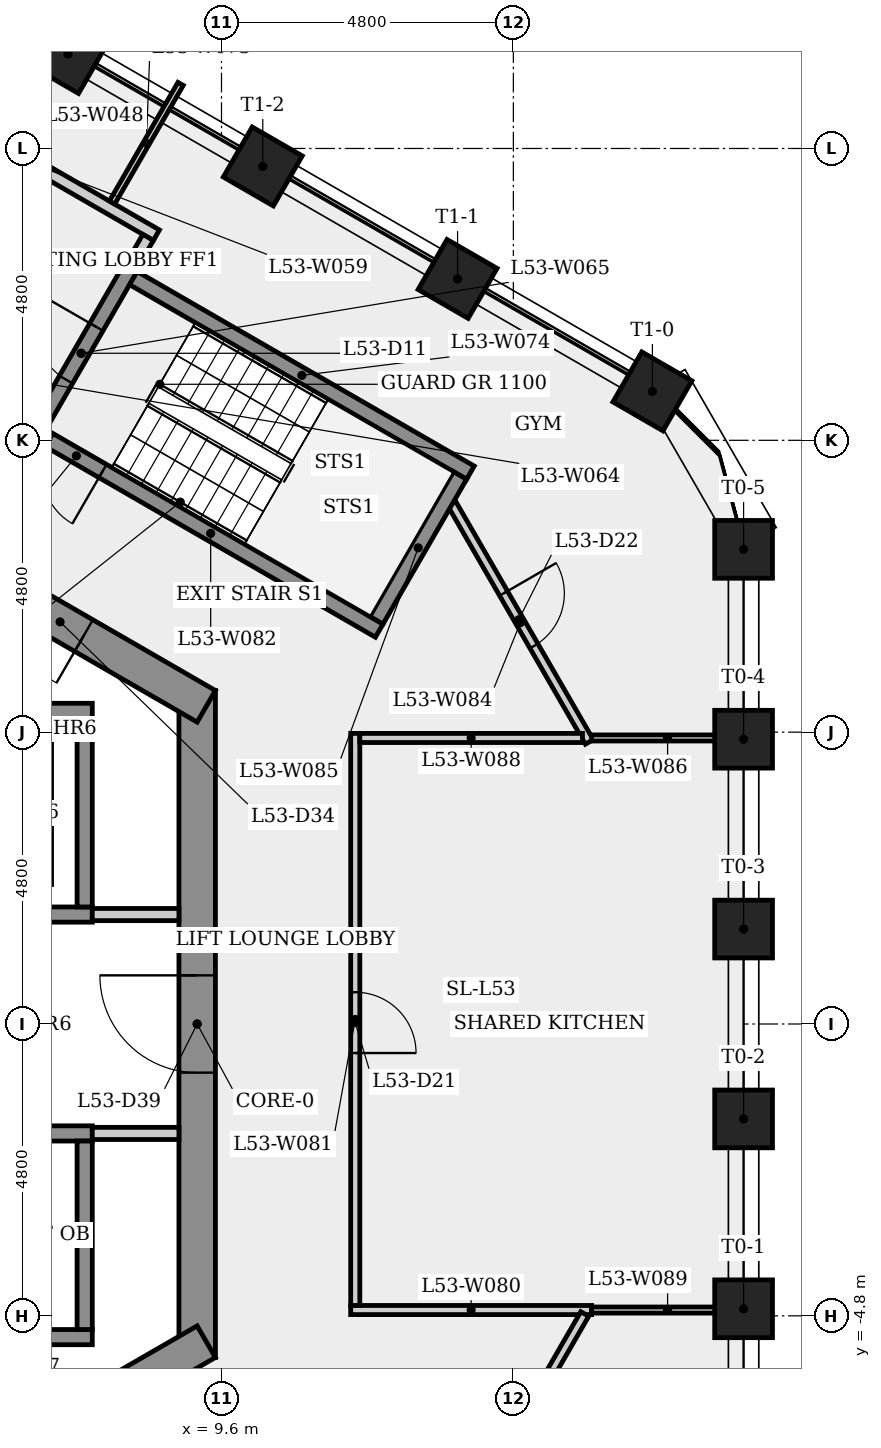
"""IFC4 building model, lengths in metres.
Left out: names, types, materials, properties, quantities, classifications, styles, units other than length and angle.
Written with IfcOpenShell. Run it as: python <this file> out.ifc"""

import sys

from ifc_helpers import new_model, si_unit, direction, frame, frame_2d, origin, origin_2d, place, context, subcontext, project, spatial, rectangle, extrude, element, fill, save


model = new_model("IFC4")
c1 = context("Model", 3, precision=1e-05, world=origin(), true_north=direction((0.0, 1.0)))
c2 = subcontext(c1, "Body", "Model", "MODEL_VIEW")
j1 = project(units=[si_unit("LENGTHUNIT", "METRE"), si_unit("PLANEANGLEUNIT", "RADIAN")], contexts=[c1])
p1 = place(None, origin())
s1 = spatial("IfcSite", under=j1, at=p1, CompositionType="ELEMENT")
p2 = place(p1, origin())
s2 = spatial("IfcBuilding", under=s1, at=p2, CompositionType="ELEMENT")
p3 = place(p2, frame((0.0, 0.0, 198.7)))
s3 = spatial("IfcBuildingStorey", under=s2, at=p3, CompositionType="ELEMENT", Elevation=198.7)
p4 = place(p3, frame((9.2, -5.485, 0.0), z_axis=(0.0, 0.0, 1.0), x_axis=(0.0, 1.0, 0.0)))
e1 = element("IfcWall", 1, at=p4, inside=s3, PredefinedType="SHEAR", context=c2, shape_type="SweptSolid", body=[
    extrude(rectangle(XDim=10.97, YDim=0.6, at=frame_2d((5.485, 0.0))), origin(), (0.0, 0.0, 1.0), 3.4),
])
p5 = place(p4, frame((4.685, 0.0, 0.0)))
e2 = element("IfcOpeningElement", 2, at=p5, cuts=e1, PredefinedType="OPENING", context=c2, shape_type="SweptSolid", body=[
    extrude(rectangle(XDim=1.6, YDim=2.1, at=frame_2d((0.8, 1.05))), frame((0.0, 0.31, 0.0), z_axis=(0.0, -1.0, 0.0), x_axis=(1.0, 0.0, 0.0)), (0.0, 0.0, 1.0), 0.62),
])
p6 = place(p3, frame((9.35, 5.225, 0.0), z_axis=(0.0, 0.0, 1.0), x_axis=(-0.866023993627, 0.500002442456, 0.0)))
e3 = element("IfcWall", 3, at=p6, inside=s3, PredefinedType="SHEAR", context=c2, shape_type="SweptSolid", body=[
    extrude(rectangle(XDim=10.97, YDim=0.6, at=frame_2d((5.485, 0.0))), origin(), (0.0, 0.0, 1.0), 3.4),
])
p7 = place(p6, frame((2.326, 0.0, 0.0)))
e4 = element("IfcOpeningElement", 4, at=p7, cuts=e3, PredefinedType="OPENING", context=c2, shape_type="SweptSolid", body=[
    extrude(rectangle(XDim=0.9, YDim=2.1, at=frame_2d((0.45, 1.05))), frame((0.0, 0.31, 0.0), z_axis=(0.0, -1.0, 0.0), x_axis=(1.0, 0.0, 0.0)), (0.0, 0.0, 1.0), 0.62),
])
p8 = place(p3, frame((-0.15, -10.71, 0.0), z_axis=(0.0, 0.0, 1.0), x_axis=(0.866023993627, 0.500002442456, 0.0)))
e5 = element("IfcWall", 5, at=p8, inside=s3, PredefinedType="SHEAR", context=c2, shape_type="SweptSolid", body=[
    extrude(rectangle(XDim=10.97, YDim=0.6, at=frame_2d((5.485, 0.0))), origin(), (0.0, 0.0, 1.0), 3.4),
])
p9 = place(p8, frame((6.935, 0.0, 0.0)))
e6 = element("IfcOpeningElement", 6, at=p9, cuts=e5, PredefinedType="OPENING", context=c2, shape_type="SweptSolid", body=[
    extrude(rectangle(XDim=0.9, YDim=2.1, at=frame_2d((0.45, 1.05))), frame((0.0, 0.31, 0.0), z_axis=(0.0, -1.0, 0.0), x_axis=(1.0, 0.0, 0.0)), (0.0, 0.0, 1.0), 0.62),
])
for number, where, z_axis, x_axis in (
    (7, (18.187, -4.684, 0.0), (0.0, 0.0, 1.0), (1.0, 0.0, 0.0)),
    (8, (18.187, -1.561, 0.0), (0.0, 0.0, 1.0), (1.0, 0.0, 0.0)),
    (9, (18.187, 1.561, 0.0), (0.0, 0.0, 1.0), (1.0, 0.0, 0.0)),
    (10, (18.187, 4.684, 0.0), (0.0, 0.0, 1.0), (1.0, 0.0, 0.0)),
    (11, (18.187, 7.807, 0.0), (0.0, 0.0, 1.0), (1.0, 0.0, 0.0)),
    (12, (16.687, 10.405, 0.0), (0.0, 0.0, 1.0), (0.5, 0.866, 0.0)),
    (13, (13.483, 12.254, 0.0), (0.0, 0.0, 1.0), (0.5, 0.866, 0.0)),
    (14, (10.279, 14.104, 0.0), (0.0, 0.0, 1.0), (0.5, 0.866, 0.0)),
    (15, (7.075, 15.954, 0.0), (0.0, 0.0, 1.0), (0.5, 0.866, 0.0)),
):
    element("IfcColumn", number, at=place(p3, frame(where, z_axis=z_axis, x_axis=x_axis)), inside=s3, PredefinedType="COLUMN", context=c2, shape_type="SweptSolid", body=[
        extrude(rectangle(XDim=0.95, YDim=0.95, at=origin_2d()), origin(), (0.0, 0.0, 1.0), 3.4),
    ])
p10 = place(p3, frame((-7.475, 1.8, 0.0), z_axis=(0.0, 0.0, 1.0), x_axis=(1.0, 0.0, 0.0)))
e16 = element("IfcWall", 16, at=p10, inside=s3, PredefinedType="SHEAR", context=c2, shape_type="SweptSolid", body=[
    extrude(rectangle(XDim=14.95, YDim=0.25, at=frame_2d((7.475, 0.0))), origin(), (0.0, 0.0, 1.0), 3.0),
])
p11 = place(p10, frame((0.8, 0.0, 0.0)))
e17 = element("IfcOpeningElement", 17, at=p11, cuts=e16, PredefinedType="OPENING", context=c2, shape_type="SweptSolid", body=[
    extrude(rectangle(XDim=1.1, YDim=2.1, at=frame_2d((0.55, 1.05))), frame((0.0, 0.135, 0.0), z_axis=(0.0, -1.0, 0.0), x_axis=(1.0, 0.0, 0.0)), (0.0, 0.0, 1.0), 0.27),
])
p12 = place(p10, frame((3.25, 0.0, 0.0)))
e18 = element("IfcOpeningElement", 18, at=p12, cuts=e16, PredefinedType="OPENING", context=c2, shape_type="SweptSolid", body=[
    extrude(rectangle(XDim=1.1, YDim=2.1, at=frame_2d((0.55, 1.05))), frame((0.0, 0.135, 0.0), z_axis=(0.0, -1.0, 0.0), x_axis=(1.0, 0.0, 0.0)), (0.0, 0.0, 1.0), 0.27),
])
p13 = place(p10, frame((5.7, 0.0, 0.0)))
e19 = element("IfcOpeningElement", 19, at=p13, cuts=e16, PredefinedType="OPENING", context=c2, shape_type="SweptSolid", body=[
    extrude(rectangle(XDim=1.1, YDim=2.1, at=frame_2d((0.55, 1.05))), frame((0.0, 0.135, 0.0), z_axis=(0.0, -1.0, 0.0), x_axis=(1.0, 0.0, 0.0)), (0.0, 0.0, 1.0), 0.27),
])
p14 = place(p10, frame((8.15, 0.0, 0.0)))
e20 = element("IfcOpeningElement", 20, at=p14, cuts=e16, PredefinedType="OPENING", context=c2, shape_type="SweptSolid", body=[
    extrude(rectangle(XDim=1.1, YDim=2.1, at=frame_2d((0.55, 1.05))), frame((0.0, 0.135, 0.0), z_axis=(0.0, -1.0, 0.0), x_axis=(1.0, 0.0, 0.0)), (0.0, 0.0, 1.0), 0.27),
])
p15 = place(p10, frame((10.6, 0.0, 0.0)))
e21 = element("IfcOpeningElement", 21, at=p15, cuts=e16, PredefinedType="OPENING", context=c2, shape_type="SweptSolid", body=[
    extrude(rectangle(XDim=1.1, YDim=2.1, at=frame_2d((0.55, 1.05))), frame((0.0, 0.135, 0.0), z_axis=(0.0, -1.0, 0.0), x_axis=(1.0, 0.0, 0.0)), (0.0, 0.0, 1.0), 0.27),
])
p16 = place(p10, frame((13.05, 0.0, 0.0)))
e22 = element("IfcOpeningElement", 22, at=p16, cuts=e16, PredefinedType="OPENING", context=c2, shape_type="SweptSolid", body=[
    extrude(rectangle(XDim=1.1, YDim=2.1, at=frame_2d((0.55, 1.05))), frame((0.0, 0.135, 0.0), z_axis=(0.0, -1.0, 0.0), x_axis=(1.0, 0.0, 0.0)), (0.0, 0.0, 1.0), 0.27),
])
p17 = place(p3, frame((-7.225, 5.15, 0.0), z_axis=(0.0, 0.0, 1.0), x_axis=(1.0, 0.0, 0.0)))
e23 = element("IfcWall", 23, at=p17, inside=s3, PredefinedType="SHEAR", context=c2, shape_type="SweptSolid", body=[
    extrude(rectangle(XDim=14.7, YDim=0.25, at=frame_2d((7.35, 0.0))), origin(), (0.0, 0.0, 1.0), 3.0),
])
p18 = place(p3, frame((4.459, 15.323, 0.0), z_axis=(0.0, 0.0, 1.0), x_axis=(0.866016039709, -0.500016218704, 0.0)))
e24 = element("IfcWall", 24, at=p18, inside=s3, PredefinedType="PARTITIONING", context=c2, shape_type="SweptSolid", body=[
    extrude(rectangle(XDim=4.7, YDim=0.2, at=frame_2d((2.35, 0.0))), origin(), (0.0, 0.0, 1.0), 3.0),
])
p19 = place(p3, frame((2.575, -5.15, 0.0), z_axis=(0.0, 0.0, 1.0), x_axis=(1.0, 0.0, 0.0)))
e25 = element("IfcWall", 25, at=p19, inside=s3, PredefinedType="SHEAR", context=c2, shape_type="SweptSolid", body=[
    extrude(rectangle(XDim=4.9, YDim=0.25, at=frame_2d((2.45, 0.0))), origin(), (0.0, 0.0, 1.0), 3.0),
])
p20 = place(p3, frame((2.575, -1.8, 0.0), z_axis=(0.0, 0.0, 1.0), x_axis=(1.0, 0.0, 0.0)))
e26 = element("IfcWall", 26, at=p20, inside=s3, PredefinedType="SHEAR", context=c2, shape_type="SweptSolid", body=[
    extrude(rectangle(XDim=4.9, YDim=0.25, at=frame_2d((2.45, 0.0))), origin(), (0.0, 0.0, 1.0), 3.0),
])
p21 = place(p20, frame((0.597, 0.0, 0.0)))
e27 = element("IfcOpeningElement", 27, at=p21, cuts=e26, PredefinedType="OPENING", context=c2, shape_type="SweptSolid", body=[
    extrude(rectangle(XDim=1.1, YDim=2.1, at=frame_2d((0.55, 1.05))), frame((0.0, 0.135, 0.0), z_axis=(0.0, -1.0, 0.0), x_axis=(1.0, 0.0, 0.0)), (0.0, 0.0, 1.0), 0.27),
])
p22 = place(p3, frame((6.48, 9.624, 0.0), z_axis=(0.0, 0.0, 1.0), x_axis=(0.500017246033, 0.866015446554, 0.0)))
e28 = element("IfcWall", 28, at=p22, inside=s3, PredefinedType="SHEAR", context=c2, shape_type="SweptSolid", body=[
    extrude(rectangle(XDim=3.25, YDim=0.25, at=frame_2d((1.625, 0.0))), origin(), (0.0, 0.0, 1.0), 3.0),
])
p23 = place(p22, frame((1.125, 0.0, 0.0)))
e29 = element("IfcOpeningElement", 29, at=p23, cuts=e28, PredefinedType="OPENING", context=c2, shape_type="SweptSolid", body=[
    extrude(rectangle(XDim=1.0, YDim=2.1, at=frame_2d((0.5, 1.05))), frame((0.0, 0.135, 0.0), z_axis=(0.0, -1.0, 0.0), x_axis=(1.0, 0.0, 0.0)), (0.0, 0.0, 1.0), 0.27),
])
p24 = place(p3, frame((7.475, 1.8, 0.0), z_axis=(0.0, 0.0, 1.0), x_axis=(1.0, 0.0, 0.0)))
e30 = element("IfcWall", 30, at=p24, inside=s3, PredefinedType="PARTITIONING", context=c2, shape_type="SweptSolid", body=[
    extrude(rectangle(XDim=1.425, YDim=0.2, at=frame_2d((0.712, 0.0))), origin(), (0.0, 0.0, 1.0), 3.0),
])
for number, where, z_axis, x_axis in (
    (31, (7.35, -1.925, 0.0), (0.0, 0.0, 1.0), (0.0, -1.0, 0.0)),
    (32, (7.35, 5.025, 0.0), (0.0, 0.0, 1.0), (0.0, -1.0, 0.0)),
):
    element("IfcWall", number, at=place(p3, frame(where, z_axis=z_axis, x_axis=x_axis)), inside=s3, PredefinedType="SHEAR", context=c2, shape_type="SweptSolid", body=[
        extrude(rectangle(XDim=3.1, YDim=0.25, at=frame_2d((1.55, 0.0))), origin(), (0.0, 0.0, 1.0), 3.4),
    ])
p25 = place(p3, frame((7.8, 13.51, 0.0), z_axis=(0.0, 0.0, 1.0), x_axis=(0.499994306202, 0.866028691075, 0.0)))
e33 = element("IfcWall", 33, at=p25, inside=s3, PredefinedType="PARTITIONING", context=c2, shape_type="SweptSolid", body=[
    extrude(rectangle(XDim=2.254, YDim=0.1, at=frame_2d((1.127, 0.0))), origin(), (0.0, 0.0, 1.0), 3.0),
])
p26 = place(p3, frame((8.151, 12.268, 0.0), z_axis=(0.0, 0.0, 1.0), x_axis=(0.866025499775, -0.499999833739, 0.0)))
e34 = element("IfcWall", 34, at=p26, inside=s3, PredefinedType="SHEAR", context=c2, shape_type="SweptSolid", body=[
    extrude(rectangle(XDim=6.4, YDim=0.25, at=frame_2d((3.2, 0.0))), origin(), (0.0, 0.0, 1.0), 3.0),
])
p27 = place(p3, frame((8.393, 12.937, 0.0), z_axis=(0.0, 0.0, 1.0), x_axis=(-0.500065409566, -0.86598763626, 0.0)))
e35 = element("IfcWall", 35, at=p27, inside=s3, PredefinedType="PARTITIONING", context=c2, shape_type="SweptSolid", body=[
    extrude(rectangle(XDim=0.575, YDim=0.2, at=frame_2d((0.288, 0.0))), origin(), (0.0, 0.0, 1.0), 3.0),
])
p28 = place(p3, frame((8.9, -1.8, 0.0), z_axis=(0.0, 0.0, 1.0), x_axis=(-1.0, 0.0, 0.0)))
e36 = element("IfcWall", 36, at=p28, inside=s3, PredefinedType="PARTITIONING", context=c2, shape_type="SweptSolid", body=[
    extrude(rectangle(XDim=1.425, YDim=0.2, at=frame_2d((0.712, 0.0))), origin(), (0.0, 0.0, 1.0), 3.0),
])
p29 = place(p3, frame((11.725, -4.705, 0.0), z_axis=(0.0, 0.0, 1.0), x_axis=(1.0, 0.0, 0.0)))
e37 = element("IfcWall", 37, at=p29, inside=s3, PredefinedType="PARTITIONING", context=c2, shape_type="SweptSolid", body=[
    extrude(rectangle(XDim=3.962, YDim=0.15, at=frame_2d((1.981, 0.0))), origin(), (0.0, 0.0, 1.0), 3.0),
])
p30 = place(p3, frame((11.8, 4.78, 0.0), z_axis=(0.0, 0.0, 1.0), x_axis=(0.0, -1.0, 0.0)))
e38 = element("IfcWall", 38, at=p30, inside=s3, PredefinedType="PARTITIONING", context=c2, shape_type="SweptSolid", body=[
    extrude(rectangle(XDim=9.409, YDim=0.15, at=frame_2d((4.705, 0.0))), origin(), (0.0, 0.0, 1.0), 3.0),
])
p31 = place(p30, frame((4.257, 0.0, 0.0)))
e39 = element("IfcOpeningElement", 39, at=p31, cuts=e38, PredefinedType="OPENING", context=c2, shape_type="SweptSolid", body=[
    extrude(rectangle(XDim=1.0, YDim=2.1, at=frame_2d((0.5, 1.05))), frame((0.0, 0.085, 0.0), z_axis=(0.0, -1.0, 0.0), x_axis=(1.0, 0.0, 0.0)), (0.0, 0.0, 1.0), 0.17),
])
p32 = place(p3, frame((12.194, 6.47, 0.0), z_axis=(0.0, 0.0, 1.0), x_axis=(-0.866025499775, 0.499999833739, 0.0)))
e40 = element("IfcWall", 40, at=p32, inside=s3, PredefinedType="SHEAR", context=c2, shape_type="SweptSolid", body=[
    extrude(rectangle(XDim=6.4, YDim=0.25, at=frame_2d((3.2, 0.0))), origin(), (0.0, 0.0, 1.0), 3.0),
])
p33 = place(p32, frame((5.25, 0.0, 0.0)))
e41 = element("IfcOpeningElement", 41, at=p33, cuts=e40, PredefinedType="OPENING", context=c2, shape_type="SweptSolid", body=[
    extrude(rectangle(XDim=1.0, YDim=2.1, at=frame_2d((0.5, 1.05))), frame((0.0, 0.135, 0.0), z_axis=(0.0, -1.0, 0.0), x_axis=(1.0, 0.0, 0.0)), (0.0, 0.0, 1.0), 0.27),
])
p34 = place(p3, frame((13.383, 8.564, 0.0), z_axis=(0.0, 0.0, 1.0), x_axis=(0.499980487887, -0.866036668815, 0.0)))
e42 = element("IfcWall", 42, at=p34, inside=s3, PredefinedType="PARTITIONING", context=c2, shape_type="SweptSolid", body=[
    extrude(rectangle(XDim=4.532, YDim=0.15, at=frame_2d((2.266, 0.0))), origin(), (0.0, 0.0, 1.0), 3.0),
])
p35 = place(p34, frame((1.711, 0.0, 0.0)))
e43 = element("IfcOpeningElement", 43, at=p35, cuts=e42, PredefinedType="OPENING", context=c2, shape_type="SweptSolid", body=[
    extrude(rectangle(XDim=1.0, YDim=2.1, at=frame_2d((0.5, 1.05))), frame((0.0, 0.085, 0.0), z_axis=(0.0, -1.0, 0.0), x_axis=(1.0, 0.0, 0.0)), (0.0, 0.0, 1.0), 0.17),
])
p36 = place(p3, frame((12.148, 6.641, 0.0), z_axis=(0.0, 0.0, 1.0), x_axis=(0.500034990121, 0.866005201286, 0.0)))
e44 = element("IfcWall", 44, at=p36, inside=s3, PredefinedType="SHEAR", context=c2, shape_type="SweptSolid", body=[
    extrude(rectangle(XDim=2.75, YDim=0.25, at=frame_2d((1.375, 0.0))), origin(), (0.0, 0.0, 1.0), 3.0),
])
p37 = place(p3, frame((15.687, 4.705, 0.0), z_axis=(0.0, 0.0, 1.0), x_axis=(1.0, 0.0, 0.0)))
e45 = element("IfcWall", 45, at=p37, inside=s3, PredefinedType="PARTITIONING", context=c2, shape_type="SweptSolid", body=[
    extrude(rectangle(XDim=2.5, YDim=0.1, at=frame_2d((1.25, 0.0))), origin(), (0.0, 0.0, 1.0), 3.0),
])
p38 = place(p3, frame((15.574, -4.769, 0.0), z_axis=(0.0, 0.0, 1.0), x_axis=(-0.499999914436, -0.866025453185, 0.0)))
e46 = element("IfcWall", 46, at=p38, inside=s3, PredefinedType="PARTITIONING", context=c2, shape_type="SweptSolid", body=[
    extrude(rectangle(XDim=7.896, YDim=0.15, at=frame_2d((3.948, 0.0))), origin(), (0.0, 0.0, 1.0), 3.0),
])
p39 = place(p38, frame((3.448, 0.0, 0.0)))
e47 = element("IfcOpeningElement", 47, at=p39, cuts=e46, PredefinedType="OPENING", context=c2, shape_type="SweptSolid", body=[
    extrude(rectangle(XDim=1.0, YDim=2.1, at=frame_2d((0.5, 1.05))), frame((0.0, 0.085, 0.0), z_axis=(0.0, -1.0, 0.0), x_axis=(1.0, 0.0, 0.0)), (0.0, 0.0, 1.0), 0.17),
])
p40 = place(p3, frame((15.537, 4.705, 0.0), z_axis=(0.0, 0.0, 1.0), x_axis=(-1.0, 0.0, 0.0)))
e48 = element("IfcWall", 48, at=p40, inside=s3, PredefinedType="PARTITIONING", context=c2, shape_type="SweptSolid", body=[
    extrude(rectangle(XDim=3.662, YDim=0.15, at=frame_2d((1.831, 0.0))), origin(), (0.0, 0.0, 1.0), 3.0),
])
p41 = place(p3, frame((18.187, -4.705, 0.0), z_axis=(0.0, 0.0, 1.0), x_axis=(-1.0, 0.0, 0.0)))
e49 = element("IfcWall", 49, at=p41, inside=s3, PredefinedType="PARTITIONING", context=c2, shape_type="SweptSolid", body=[
    extrude(rectangle(XDim=2.5, YDim=0.1, at=frame_2d((1.25, 0.0))), origin(), (0.0, 0.0, 1.0), 3.0),
])
p42 = place(p33, origin())
e50 = element("IfcDoor", 50, at=p42, inside=s3, OperationType="SINGLE_SWING_LEFT", PredefinedType="DOOR", context=c2, shape_type="SweptSolid", body=[
    extrude(rectangle(XDim=1.0, YDim=2.1, at=frame_2d((0.5, 1.05))), frame((0.0, 0.025, 0.0), z_axis=(0.0, -1.0, 0.0), x_axis=(1.0, 0.0, 0.0)), (0.0, 0.0, 1.0), 0.05),
])
fill(e41, e50)
p43 = place(p23, origin())
e51 = element("IfcDoor", 51, at=p43, inside=s3, OperationType="SINGLE_SWING_RIGHT", PredefinedType="DOOR", context=c2, shape_type="SweptSolid", body=[
    extrude(rectangle(XDim=1.0, YDim=2.1, at=frame_2d((0.5, 1.05))), frame((0.0, 0.025, 0.0), z_axis=(0.0, -1.0, 0.0), x_axis=(1.0, 0.0, 0.0)), (0.0, 0.0, 1.0), 0.05),
])
fill(e29, e51)
p44 = place(p31, origin())
e52 = element("IfcDoor", 52, at=p44, inside=s3, OperationType="SINGLE_SWING_RIGHT", PredefinedType="DOOR", context=c2, shape_type="SweptSolid", body=[
    extrude(rectangle(XDim=1.0, YDim=2.1, at=frame_2d((0.5, 1.05))), frame((0.0, 0.025, 0.0), z_axis=(0.0, -1.0, 0.0), x_axis=(1.0, 0.0, 0.0)), (0.0, 0.0, 1.0), 0.05),
])
fill(e39, e52)
p45 = place(p35, origin())
e53 = element("IfcDoor", 53, at=p45, inside=s3, OperationType="SINGLE_SWING_LEFT", PredefinedType="DOOR", context=c2, shape_type="SweptSolid", body=[
    extrude(rectangle(XDim=1.0, YDim=2.1, at=frame_2d((0.5, 1.05))), frame((0.0, 0.025, 0.0), z_axis=(0.0, -1.0, 0.0), x_axis=(1.0, 0.0, 0.0)), (0.0, 0.0, 1.0), 0.05),
])
fill(e43, e53)
p46 = place(p7, origin())
e54 = element("IfcDoor", 54, at=p46, inside=s3, OperationType="SINGLE_SWING_LEFT", PredefinedType="DOOR", context=c2, shape_type="SweptSolid", body=[
    extrude(rectangle(XDim=0.9, YDim=2.1, at=frame_2d((0.45, 1.05))), frame((0.0, 0.025, 0.0), z_axis=(0.0, -1.0, 0.0), x_axis=(1.0, 0.0, 0.0)), (0.0, 0.0, 1.0), 0.05),
])
fill(e4, e54)
p47 = place(p5, origin())
e55 = element("IfcDoor", 55, at=p47, inside=s3, OperationType="SINGLE_SWING_RIGHT", PredefinedType="DOOR", context=c2, shape_type="SweptSolid", body=[
    extrude(rectangle(XDim=1.6, YDim=2.1, at=frame_2d((0.8, 1.05))), frame((0.0, 0.025, 0.0), z_axis=(0.0, -1.0, 0.0), x_axis=(1.0, 0.0, 0.0)), (0.0, 0.0, 1.0), 0.05),
])
fill(e2, e55)
save(model, sys.argv[1])
